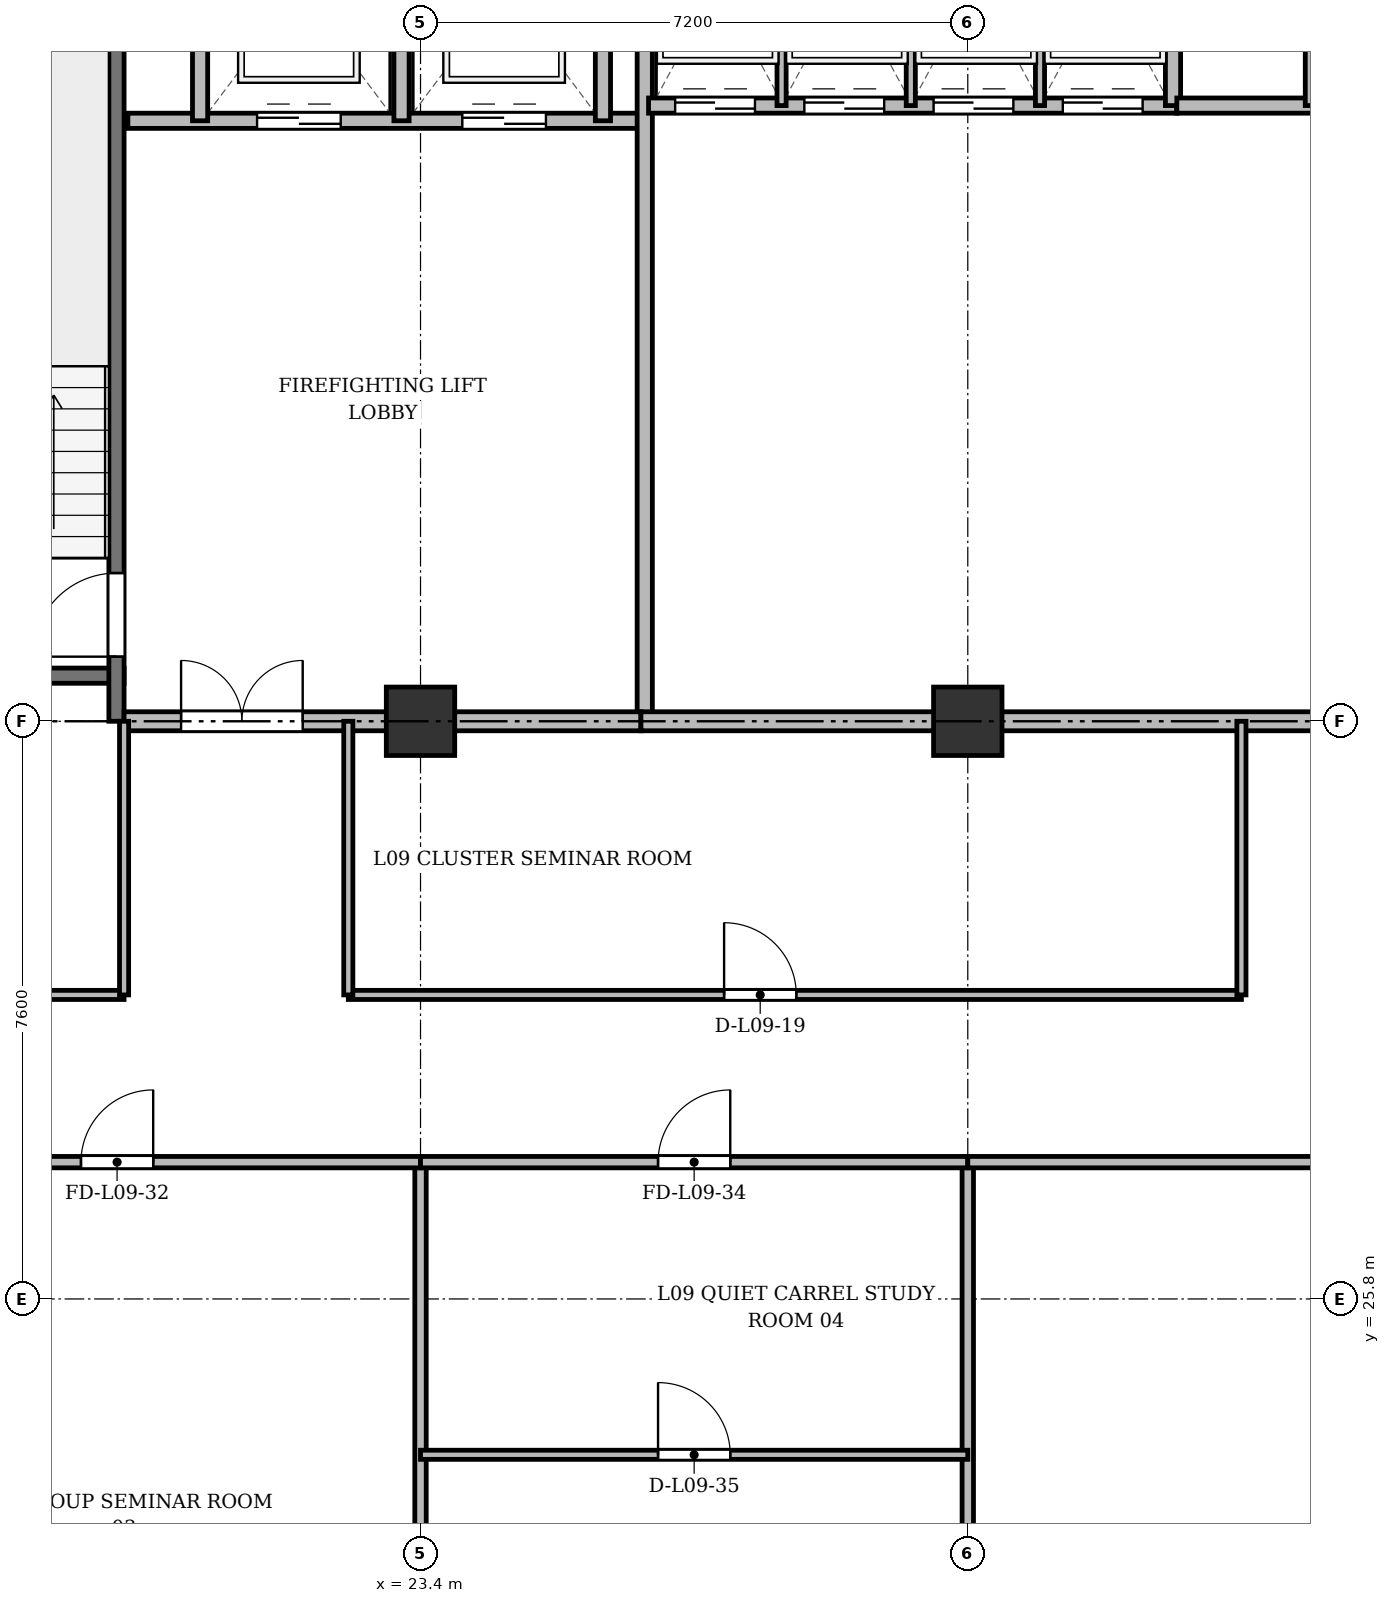
"""IFC4 building model, lengths in metres.
Left out: names, types, materials, properties, quantities, classifications, styles, units other than length and angle.
Written with IfcOpenShell. Run it as: python <this file> out.ifc"""

import sys

from ifc_helpers import new_model, si_unit, direction, frame, frame_2d, origin, origin_2d, place, context, subcontext, project, spatial, rectangle, extrude, source, transform, mapped, element, fill, save


model = new_model("IFC4")
c1 = context("Model", 3, precision=1e-05, world=origin(), true_north=direction((0.0, 1.0)))
c2 = subcontext(c1, "Body", "Model", "MODEL_VIEW")
j1 = project(units=[si_unit("LENGTHUNIT", "METRE"), si_unit("PLANEANGLEUNIT", "RADIAN")], contexts=[c1])
p1 = place(None, origin())
s1 = spatial("IfcSite", under=j1, at=p1, CompositionType="ELEMENT")
p2 = place(p1, origin())
s2 = spatial("IfcBuilding", under=s1, at=p2, CompositionType="ELEMENT")
p3 = place(p2, frame((0.0, 0.0, 37.9)))
s3 = spatial("IfcBuildingStorey", under=s2, at=p3, CompositionType="ELEMENT", Elevation=37.9)
m1 = source(origin(), c2, "Body", "SweptSolid", [
    extrude(rectangle(XDim=0.9, YDim=0.9, at=origin_2d()), origin(), (0.0, 0.0, 1.0), 3.6),
])
for number, where, z_axis, x_axis in (
    (1, (23.4, 33.4, 0.0), (0.0, 0.0, 1.0), (1.0, 0.0, 0.0)),
    (2, (30.6, 33.4, 0.0), (0.0, 0.0, 1.0), (1.0, 0.0, 0.0)),
):
    element("IfcColumn", number, at=place(p3, frame(where, z_axis=z_axis, x_axis=x_axis)), inside=s3, PredefinedType="COLUMN", context=c2, shape_type="MappedRepresentation", body=[
        mapped(m1, transform((0.0, 0.0, 0.0), x_axis=(1.0, 0.0, 0.0), y_axis=(0.0, 1.0, 0.0), z_axis=(0.0, 0.0, 1.0), scale=1.0)),
    ])
p4 = place(p3, frame((16.1, 34.0, 0.0), z_axis=(0.0, 0.0, 1.0), x_axis=(1.0, 0.0, 0.0)))
e3 = element("IfcWall", 3, at=p4, inside=s3, PredefinedType="SHEAR", context=c2, shape_type="SweptSolid", body=[
    extrude(rectangle(XDim=3.4, YDim=0.2, at=frame_2d((1.7, 0.0))), origin(), (0.0, 0.0, 1.0), 3.34),
])
p5 = place(p3, frame((19.4, 33.4, 0.0), z_axis=(0.0, 0.0, 1.0), x_axis=(0.0, 1.0, 0.0)))
e4 = element("IfcWall", 4, at=p5, inside=s3, PredefinedType="SHEAR", context=c2, shape_type="SweptSolid", body=[
    extrude(rectangle(XDim=11.1, YDim=0.2, at=frame_2d((5.55, 0.0))), origin(), (0.0, 0.0, 1.0), 3.34),
])
p6 = place(p5, frame((0.85, 0.0, 0.0)))
e5 = element("IfcOpeningElement", 5, at=p6, cuts=e4, PredefinedType="OPENING", context=c2, shape_type="SweptSolid", body=[
    extrude(rectangle(XDim=1.1, YDim=2.15, at=frame_2d((0.55, 1.075))), frame((0.0, 0.11, 0.0), z_axis=(0.0, -1.0, 0.0), x_axis=(1.0, 0.0, 0.0)), (0.0, 0.0, 1.0), 0.22),
])
p7 = place(p3, frame((19.55, 41.3, 0.0), z_axis=(0.0, 0.0, 1.0), x_axis=(1.0, 0.0, 0.0)))
e6 = element("IfcWall", 6, at=p7, inside=s3, PredefinedType="SOLIDWALL", context=c2, shape_type="SweptSolid", body=[
    extrude(rectangle(XDim=6.75, YDim=0.2, at=frame_2d((3.375, 0.0))), origin(), (0.0, 0.0, 1.0), 3.34),
])
p8 = place(p7, frame((1.7, 0.0, 0.0)))
e7 = element("IfcOpeningElement", 7, at=p8, cuts=e6, PredefinedType="OPENING", context=c2, shape_type="SweptSolid", body=[
    extrude(rectangle(XDim=1.1, YDim=2.15, at=frame_2d((0.55, 1.075))), frame((0.0, 0.11, 0.0), z_axis=(0.0, -1.0, 0.0), x_axis=(1.0, 0.0, 0.0)), (0.0, 0.0, 1.0), 0.22),
])
p9 = place(p7, frame((4.4, 0.0, 0.0)))
e8 = element("IfcOpeningElement", 8, at=p9, cuts=e6, PredefinedType="OPENING", context=c2, shape_type="SweptSolid", body=[
    extrude(rectangle(XDim=1.1, YDim=2.15, at=frame_2d((0.55, 1.075))), frame((0.0, 0.11, 0.0), z_axis=(0.0, -1.0, 0.0), x_axis=(1.0, 0.0, 0.0)), (0.0, 0.0, 1.0), 0.22),
])
for number, where, z_axis, x_axis in (
    (9, (20.5, 41.3, 0.0), (0.0, 0.0, 1.0), (0.0, 1.0, 0.0)),
    (10, (23.15, 41.3, 0.0), (0.0, 0.0, 1.0), (0.0, 1.0, 0.0)),
    (11, (25.8, 41.3, 0.0), (0.0, 0.0, 1.0), (0.0, 1.0, 0.0)),
):
    element("IfcWall", number, at=place(p3, frame(where, z_axis=z_axis, x_axis=x_axis)), inside=s3, PredefinedType="SOLIDWALL", context=c2, shape_type="SweptSolid", body=[
        extrude(rectangle(XDim=3.4, YDim=0.2, at=frame_2d((1.7, 0.0))), origin(), (0.0, 0.0, 1.0), 3.34),
    ])
p10 = place(p3, frame((26.35, 33.4, 0.0), z_axis=(0.0, 0.0, 1.0), x_axis=(0.0, 1.0, 0.0)))
e12 = element("IfcWall", 12, at=p10, inside=s3, PredefinedType="SOLIDWALL", context=c2, shape_type="SweptSolid", body=[
    extrude(rectangle(XDim=11.3, YDim=0.2, at=frame_2d((5.65, 0.0))), origin(), (0.0, 0.0, 1.0), 2.69),
])
p11 = place(p3, frame((19.5, 33.4, 0.0), z_axis=(0.0, 0.0, 1.0), x_axis=(1.0, 0.0, 0.0)))
e13 = element("IfcWall", 13, at=p11, inside=s3, PredefinedType="PARTITIONING", context=c2, shape_type="SweptSolid", body=[
    extrude(rectangle(XDim=6.8, YDim=0.25, at=frame_2d((3.4, 0.0))), origin(), (0.0, 0.0, 1.0), 2.69),
])
p12 = place(p11, frame((0.75, 0.0, 0.0)))
e14 = element("IfcOpeningElement", 14, at=p12, cuts=e13, PredefinedType="OPENING", context=c2, shape_type="SweptSolid", body=[
    extrude(rectangle(XDim=1.6, YDim=2.2, at=frame_2d((0.8, 1.1))), frame((0.0, 0.135, 0.0), z_axis=(0.0, -1.0, 0.0), x_axis=(1.0, 0.0, 0.0)), (0.0, 0.0, 1.0), 0.27),
])
p13 = place(p3, frame((26.4, 41.5, 0.0), z_axis=(0.0, 0.0, 1.0), x_axis=(1.0, 0.0, 0.0)))
e15 = element("IfcWall", 15, at=p13, inside=s3, PredefinedType="SOLIDWALL", context=c2, shape_type="SweptSolid", body=[
    extrude(rectangle(XDim=6.95, YDim=0.2, at=frame_2d((3.475, 0.0))), origin(), (0.0, 0.0, 1.0), 3.34),
])
p14 = place(p13, frame((0.35, 0.0, 0.0)))
e16 = element("IfcOpeningElement", 16, at=p14, cuts=e15, PredefinedType="OPENING", context=c2, shape_type="SweptSolid", body=[
    extrude(rectangle(XDim=1.05, YDim=2.15, at=frame_2d((0.525, 1.075))), frame((0.0, 0.11, 0.0), z_axis=(0.0, -1.0, 0.0), x_axis=(1.0, 0.0, 0.0)), (0.0, 0.0, 1.0), 0.22),
])
p15 = place(p13, frame((2.05, 0.0, 0.0)))
e17 = element("IfcOpeningElement", 17, at=p15, cuts=e15, PredefinedType="OPENING", context=c2, shape_type="SweptSolid", body=[
    extrude(rectangle(XDim=1.05, YDim=2.15, at=frame_2d((0.525, 1.075))), frame((0.0, 0.11, 0.0), z_axis=(0.0, -1.0, 0.0), x_axis=(1.0, 0.0, 0.0)), (0.0, 0.0, 1.0), 0.22),
])
p16 = place(p13, frame((3.75, 0.0, 0.0)))
e18 = element("IfcOpeningElement", 18, at=p16, cuts=e15, PredefinedType="OPENING", context=c2, shape_type="SweptSolid", body=[
    extrude(rectangle(XDim=1.05, YDim=2.15, at=frame_2d((0.525, 1.075))), frame((0.0, 0.11, 0.0), z_axis=(0.0, -1.0, 0.0), x_axis=(1.0, 0.0, 0.0)), (0.0, 0.0, 1.0), 0.22),
])
p17 = place(p13, frame((5.45, 0.0, 0.0)))
e19 = element("IfcOpeningElement", 19, at=p17, cuts=e15, PredefinedType="OPENING", context=c2, shape_type="SweptSolid", body=[
    extrude(rectangle(XDim=1.05, YDim=2.15, at=frame_2d((0.525, 1.075))), frame((0.0, 0.11, 0.0), z_axis=(0.0, -1.0, 0.0), x_axis=(1.0, 0.0, 0.0)), (0.0, 0.0, 1.0), 0.22),
])
p18 = place(p3, frame((33.3, 41.5, 0.0), z_axis=(0.0, 0.0, 1.0), x_axis=(0.0, 1.0, 0.0)))
e20 = element("IfcWall", 20, at=p18, inside=s3, PredefinedType="SOLIDWALL", context=c2, shape_type="SweptSolid", body=[
    extrude(rectangle(XDim=3.2, YDim=0.2, at=frame_2d((1.6, 0.0))), origin(), (0.0, 0.0, 1.0), 3.34),
])
for number, where, z_axis, x_axis in (
    (21, (28.15, 41.5, 0.0), (0.0, 0.0, 1.0), (0.0, 1.0, 0.0)),
    (22, (29.85, 41.5, 0.0), (0.0, 0.0, 1.0), (0.0, 1.0, 0.0)),
    (23, (31.55, 41.5, 0.0), (0.0, 0.0, 1.0), (0.0, 1.0, 0.0)),
):
    element("IfcWall", number, at=place(p3, frame(where, z_axis=z_axis, x_axis=x_axis)), inside=s3, PredefinedType="PARTITIONING", context=c2, shape_type="SweptSolid", body=[
        extrude(rectangle(XDim=3.2, YDim=0.12, at=frame_2d((1.6, 0.0))), origin(), (0.0, 0.0, 1.0), 3.34),
    ])
p19 = place(p3, frame((33.35, 41.5, 0.0), z_axis=(0.0, 0.0, 1.0), x_axis=(1.0, 0.0, 0.0)))
e24 = element("IfcWall", 24, at=p19, inside=s3, PredefinedType="SOLIDWALL", context=c2, shape_type="SweptSolid", body=[
    extrude(rectangle(XDim=6.9, YDim=0.2, at=frame_2d((3.45, 0.0))), origin(), (0.0, 0.0, 1.0), 3.34),
])
p20 = place(p3, frame((35.1, 41.5, 0.0), z_axis=(0.0, 0.0, 1.0), x_axis=(0.0, 1.0, 0.0)))
e25 = element("IfcWall", 25, at=p20, inside=s3, PredefinedType="PARTITIONING", context=c2, shape_type="SweptSolid", body=[
    extrude(rectangle(XDim=3.2, YDim=0.12, at=frame_2d((1.6, 0.0))), origin(), (0.0, 0.0, 1.0), 3.34),
])
p21 = place(p3, frame((26.3, 33.4, 0.0), z_axis=(0.0, 0.0, 1.0), x_axis=(1.0, 0.0, 0.0)))
e26 = element("IfcWall", 26, at=p21, inside=s3, PredefinedType="PARTITIONING", context=c2, shape_type="SweptSolid", body=[
    extrude(rectangle(XDim=20.85, YDim=0.25, at=frame_2d((10.425, 0.0))), origin(), (0.0, 0.0, 1.0), 2.69),
])
p22 = place(p21, frame((9.2, 0.0, 0.0)))
e27 = element("IfcOpeningElement", 27, at=p22, cuts=e26, PredefinedType="OPENING", context=c2, shape_type="SweptSolid", body=[
    extrude(rectangle(XDim=1.6, YDim=2.2, at=frame_2d((0.8, 1.1))), frame((0.0, 0.135, 0.0), z_axis=(0.0, -1.0, 0.0), x_axis=(1.0, 0.0, 0.0)), (0.0, 0.0, 1.0), 0.27),
])
p23 = place(p3, frame((4.75, 29.8, 0.0), z_axis=(0.0, 0.0, 1.0), x_axis=(1.0, 0.0, 0.0)))
e28 = element("IfcWall", 28, at=p23, inside=s3, PredefinedType="PARTITIONING", context=c2, shape_type="SweptSolid", body=[
    extrude(rectangle(XDim=14.75, YDim=0.12, at=frame_2d((7.375, 0.0))), origin(), (0.0, 0.0, 1.0), 2.752),
])
p24 = place(p23, frame((6.9, 0.0, 0.0)))
e29 = element("IfcOpeningElement", 29, at=p24, cuts=e28, PredefinedType="OPENING", context=c2, shape_type="SweptSolid", body=[
    extrude(rectangle(XDim=0.95, YDim=2.15, at=frame_2d((0.475, 1.075))), frame((0.0, 0.07, 0.0), z_axis=(0.0, -1.0, 0.0), x_axis=(1.0, 0.0, 0.0)), (0.0, 0.0, 1.0), 0.14),
])
p25 = place(p3, frame((22.45, 29.8, 0.0), z_axis=(0.0, 0.0, 1.0), x_axis=(1.0, 0.0, 0.0)))
e30 = element("IfcWall", 30, at=p25, inside=s3, PredefinedType="PARTITIONING", context=c2, shape_type="SweptSolid", body=[
    extrude(rectangle(XDim=11.75, YDim=0.12, at=frame_2d((5.875, 0.0))), origin(), (0.0, 0.0, 1.0), 2.752),
])
p26 = place(p25, frame((4.944, 0.0, 0.0)))
e31 = element("IfcOpeningElement", 31, at=p26, cuts=e30, PredefinedType="OPENING", context=c2, shape_type="SweptSolid", body=[
    extrude(rectangle(XDim=0.95, YDim=2.15, at=frame_2d((0.475, 1.075))), frame((0.0, 0.07, 0.0), z_axis=(0.0, -1.0, 0.0), x_axis=(1.0, 0.0, 0.0)), (0.0, 0.0, 1.0), 0.14),
])
for number, where, z_axis, x_axis in (
    (32, (19.5, 29.8, 0.0), (0.0, 0.0, 1.0), (0.0, 1.0, 0.0)),
    (33, (22.45, 29.8, 0.0), (0.0, 0.0, 1.0), (0.0, 1.0, 0.0)),
    (34, (34.2, 29.8, 0.0), (0.0, 0.0, 1.0), (0.0, 1.0, 0.0)),
):
    element("IfcWall", number, at=place(p3, frame(where, z_axis=z_axis, x_axis=x_axis)), inside=s3, PredefinedType="PARTITIONING", context=c2, shape_type="SweptSolid", body=[
        extrude(rectangle(XDim=3.6, YDim=0.12, at=frame_2d((1.8, 0.0))), origin(), (0.0, 0.0, 1.0), 2.69),
    ])
for number, where, z_axis, x_axis in (
    (35, (23.4, 3.145, 0.0), (0.0, 0.0, 1.0), (0.0, 1.0, 0.0)),
    (36, (30.6, 3.145, 0.0), (0.0, 0.0, 1.0), (0.0, 1.0, 0.0)),
):
    element("IfcWall", number, at=place(p3, frame(where, z_axis=z_axis, x_axis=x_axis)), inside=s3, PredefinedType="PARTITIONING", context=c2, shape_type="SweptSolid", body=[
        extrude(rectangle(XDim=24.455, YDim=0.15, at=frame_2d((12.228, 0.0))), origin(), (0.0, 0.0, 1.0), 2.752),
    ])
p27 = place(p3, frame((15.6, 27.6, 0.0), z_axis=(0.0, 0.0, 1.0), x_axis=(1.0, 0.0, 0.0)))
e37 = element("IfcWall", 37, at=p27, inside=s3, PredefinedType="PARTITIONING", context=c2, shape_type="SweptSolid", body=[
    extrude(rectangle(XDim=7.8, YDim=0.15, at=frame_2d((3.9, 0.0))), origin(), (0.0, 0.0, 1.0), 2.752),
])
p28 = place(p27, frame((3.333, 0.0, 0.0)))
e38 = element("IfcOpeningElement", 38, at=p28, cuts=e37, PredefinedType="OPENING", context=c2, shape_type="SweptSolid", body=[
    extrude(rectangle(XDim=0.95, YDim=2.15, at=frame_2d((0.475, 1.075))), frame((0.0, 0.085, 0.0), z_axis=(0.0, -1.0, 0.0), x_axis=(1.0, 0.0, 0.0)), (0.0, 0.0, 1.0), 0.17),
])
p29 = place(p3, frame((23.4, 27.6, 0.0), z_axis=(0.0, 0.0, 1.0), x_axis=(1.0, 0.0, 0.0)))
e39 = element("IfcWall", 39, at=p29, inside=s3, PredefinedType="PARTITIONING", context=c2, shape_type="SweptSolid", body=[
    extrude(rectangle(XDim=7.2, YDim=0.15, at=frame_2d((3.6, 0.0))), origin(), (0.0, 0.0, 1.0), 2.752),
])
p30 = place(p29, frame((3.125, 0.0, 0.0)))
e40 = element("IfcOpeningElement", 40, at=p30, cuts=e39, PredefinedType="OPENING", context=c2, shape_type="SweptSolid", body=[
    extrude(rectangle(XDim=0.95, YDim=2.15, at=frame_2d((0.475, 1.075))), frame((0.0, 0.085, 0.0), z_axis=(0.0, -1.0, 0.0), x_axis=(1.0, 0.0, 0.0)), (0.0, 0.0, 1.0), 0.17),
])
p31 = place(p3, frame((23.4, 23.75, 0.0), z_axis=(0.0, 0.0, 1.0), x_axis=(1.0, 0.0, 0.0)))
e41 = element("IfcWall", 41, at=p31, inside=s3, PredefinedType="PARTITIONING", context=c2, shape_type="SweptSolid", body=[
    extrude(rectangle(XDim=7.2, YDim=0.12, at=frame_2d((3.6, 0.0))), origin(), (0.0, 0.0, 1.0), 2.752),
])
p32 = place(p31, frame((3.125, 0.0, 0.0)))
e42 = element("IfcOpeningElement", 42, at=p32, cuts=e41, PredefinedType="OPENING", context=c2, shape_type="SweptSolid", body=[
    extrude(rectangle(XDim=0.95, YDim=2.15, at=frame_2d((0.475, 1.075))), frame((0.0, 0.07, 0.0), z_axis=(0.0, -1.0, 0.0), x_axis=(1.0, 0.0, 0.0)), (0.0, 0.0, 1.0), 0.14),
])
p33 = place(p3, frame((30.6, 27.6, 0.0), z_axis=(0.0, 0.0, 1.0), x_axis=(1.0, 0.0, 0.0)))
e43 = element("IfcWall", 43, at=p33, inside=s3, PredefinedType="PARTITIONING", context=c2, shape_type="SweptSolid", body=[
    extrude(rectangle(XDim=13.2, YDim=0.15, at=frame_2d((6.6, 0.0))), origin(), (0.0, 0.0, 1.0), 2.752),
])
p34 = place(p33, frame((5.8, 0.0, 0.0)))
e44 = element("IfcOpeningElement", 44, at=p34, cuts=e43, PredefinedType="OPENING", context=c2, shape_type="SweptSolid", body=[
    extrude(rectangle(XDim=1.6, YDim=2.2, at=frame_2d((0.8, 1.1))), frame((0.0, 0.085, 0.0), z_axis=(0.0, -1.0, 0.0), x_axis=(1.0, 0.0, 0.0)), (0.0, 0.0, 1.0), 0.17),
])
m2 = source(origin(), c2, "Body", "SweptSolid", [
    extrude(rectangle(XDim=1.1, YDim=2.15, at=frame_2d((0.55, 1.075))), frame((0.0, 0.025, 0.0), z_axis=(0.0, -1.0, 0.0), x_axis=(1.0, 0.0, 0.0)), (0.0, 0.0, 1.0), 0.05),
])
p35 = place(p6, origin())
e45 = element("IfcDoor", 45, at=p35, inside=s3, OperationType="SINGLE_SWING_LEFT", PredefinedType="DOOR", context=c2, shape_type="MappedRepresentation", body=[
    mapped(m2, transform((0.0, 0.0, 0.0), x_axis=(1.0, 0.0, 0.0), y_axis=(0.0, 1.0, 0.0), z_axis=(0.0, 0.0, 1.0), scale=1.0)),
])
fill(e5, e45)
p36 = place(p8, origin())
e46 = element("IfcDoor", 46, at=p36, inside=s3, OperationType="DOUBLE_DOOR_SLIDING", PredefinedType="DOOR", context=c2, shape_type="MappedRepresentation", body=[
    mapped(m2, transform((0.0, 0.0, 0.0), x_axis=(1.0, 0.0, 0.0), y_axis=(0.0, 1.0, 0.0), z_axis=(0.0, 0.0, 1.0), scale=1.0)),
])
fill(e7, e46)
p37 = place(p9, origin())
e47 = element("IfcDoor", 47, at=p37, inside=s3, OperationType="DOUBLE_DOOR_SLIDING", PredefinedType="DOOR", context=c2, shape_type="MappedRepresentation", body=[
    mapped(m2, transform((0.0, 0.0, 0.0), x_axis=(1.0, 0.0, 0.0), y_axis=(0.0, 1.0, 0.0), z_axis=(0.0, 0.0, 1.0), scale=1.0)),
])
fill(e8, e47)
m3 = source(origin(), c2, "Body", "SweptSolid", [
    extrude(rectangle(XDim=1.6, YDim=2.2, at=frame_2d((0.8, 1.1))), frame((0.0, 0.025, 0.0), z_axis=(0.0, -1.0, 0.0), x_axis=(1.0, 0.0, 0.0)), (0.0, 0.0, 1.0), 0.05),
])
p38 = place(p12, origin())
e48 = element("IfcDoor", 48, at=p38, inside=s3, OperationType="DOUBLE_DOOR_SINGLE_SWING", PredefinedType="DOOR", context=c2, shape_type="MappedRepresentation", body=[
    mapped(m3, transform((0.0, 0.0, 0.0), x_axis=(1.0, 0.0, 0.0), y_axis=(0.0, 1.0, 0.0), z_axis=(0.0, 0.0, 1.0), scale=1.0)),
])
fill(e14, e48)
m4 = source(origin(), c2, "Body", "SweptSolid", [
    extrude(rectangle(XDim=1.05, YDim=2.15, at=frame_2d((0.525, 1.075))), frame((0.0, 0.025, 0.0), z_axis=(0.0, -1.0, 0.0), x_axis=(1.0, 0.0, 0.0)), (0.0, 0.0, 1.0), 0.05),
])
p39 = place(p14, origin())
e49 = element("IfcDoor", 49, at=p39, inside=s3, OperationType="DOUBLE_DOOR_SLIDING", PredefinedType="DOOR", context=c2, shape_type="MappedRepresentation", body=[
    mapped(m4, transform((0.0, 0.0, 0.0), x_axis=(1.0, 0.0, 0.0), y_axis=(0.0, 1.0, 0.0), z_axis=(0.0, 0.0, 1.0), scale=1.0)),
])
fill(e16, e49)
p40 = place(p15, origin())
e50 = element("IfcDoor", 50, at=p40, inside=s3, OperationType="DOUBLE_DOOR_SLIDING", PredefinedType="DOOR", context=c2, shape_type="MappedRepresentation", body=[
    mapped(m4, transform((0.0, 0.0, 0.0), x_axis=(1.0, 0.0, 0.0), y_axis=(0.0, 1.0, 0.0), z_axis=(0.0, 0.0, 1.0), scale=1.0)),
])
fill(e17, e50)
p41 = place(p16, origin())
e51 = element("IfcDoor", 51, at=p41, inside=s3, OperationType="DOUBLE_DOOR_SLIDING", PredefinedType="DOOR", context=c2, shape_type="MappedRepresentation", body=[
    mapped(m4, transform((0.0, 0.0, 0.0), x_axis=(1.0, 0.0, 0.0), y_axis=(0.0, 1.0, 0.0), z_axis=(0.0, 0.0, 1.0), scale=1.0)),
])
fill(e18, e51)
p42 = place(p17, origin())
e52 = element("IfcDoor", 52, at=p42, inside=s3, OperationType="DOUBLE_DOOR_SLIDING", PredefinedType="DOOR", context=c2, shape_type="MappedRepresentation", body=[
    mapped(m4, transform((0.0, 0.0, 0.0), x_axis=(1.0, 0.0, 0.0), y_axis=(0.0, 1.0, 0.0), z_axis=(0.0, 0.0, 1.0), scale=1.0)),
])
fill(e19, e52)
m5 = source(origin(), c2, "Body", "SweptSolid", [
    extrude(rectangle(XDim=0.95, YDim=2.15, at=frame_2d((0.475, 1.075))), frame((0.0, 0.025, 0.0), z_axis=(0.0, -1.0, 0.0), x_axis=(1.0, 0.0, 0.0)), (0.0, 0.0, 1.0), 0.05),
])
p43 = place(p26, origin())
e53 = element("IfcDoor", 53, at=p43, inside=s3, OperationType="SINGLE_SWING_LEFT", PredefinedType="DOOR", context=c2, shape_type="MappedRepresentation", body=[
    mapped(m5, transform((0.0, 0.0, 0.0), x_axis=(1.0, 0.0, 0.0), y_axis=(0.0, 1.0, 0.0), z_axis=(0.0, 0.0, 1.0), scale=1.0)),
])
fill(e31, e53)
p44 = place(p28, origin())
e54 = element("IfcDoor", 54, at=p44, inside=s3, OperationType="SINGLE_SWING_RIGHT", PredefinedType="DOOR", context=c2, shape_type="MappedRepresentation", body=[
    mapped(m5, transform((0.0, 0.0, 0.0), x_axis=(1.0, 0.0, 0.0), y_axis=(0.0, 1.0, 0.0), z_axis=(0.0, 0.0, 1.0), scale=1.0)),
])
fill(e38, e54)
p45 = place(p30, origin())
e55 = element("IfcDoor", 55, at=p45, inside=s3, OperationType="SINGLE_SWING_RIGHT", PredefinedType="DOOR", context=c2, shape_type="MappedRepresentation", body=[
    mapped(m5, transform((0.0, 0.0, 0.0), x_axis=(1.0, 0.0, 0.0), y_axis=(0.0, 1.0, 0.0), z_axis=(0.0, 0.0, 1.0), scale=1.0)),
])
fill(e40, e55)
p46 = place(p32, origin())
e56 = element("IfcDoor", 56, at=p46, inside=s3, OperationType="SINGLE_SWING_LEFT", PredefinedType="DOOR", context=c2, shape_type="MappedRepresentation", body=[
    mapped(m5, transform((0.0, 0.0, 0.0), x_axis=(1.0, 0.0, 0.0), y_axis=(0.0, 1.0, 0.0), z_axis=(0.0, 0.0, 1.0), scale=1.0)),
])
fill(e42, e56)
save(model, sys.argv[1])
